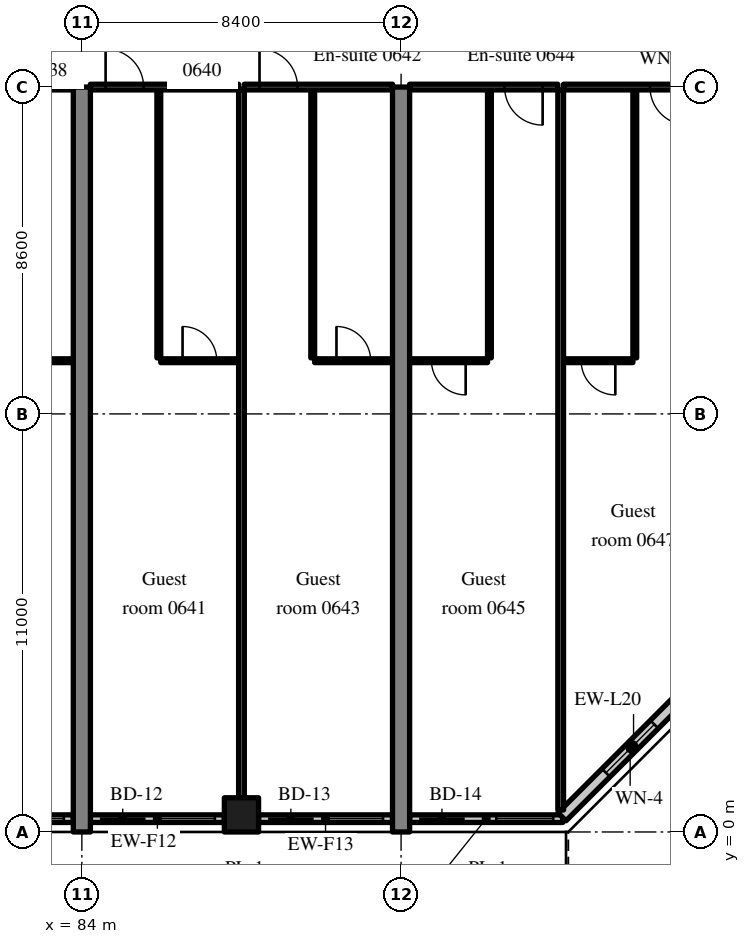
"""IFC4 building model, lengths in metres.
Left out: names, types, materials, properties, quantities, classifications, styles, units other than length and angle.
Written with IfcOpenShell. Run it as: python <this file> out.ifc"""

import sys

from ifc_helpers import new_model, si_unit, direction, frame, frame_2d, origin, origin_2d, place, context, subcontext, project, spatial, rectangle, extrude, source, transform, mapped, element, fill, save


model = new_model("IFC4")
c1 = context("Model", 3, precision=1e-05, world=origin(), true_north=direction((0.0, 1.0)))
c2 = subcontext(c1, "Body", "Model", "MODEL_VIEW")
j1 = project(units=[si_unit("LENGTHUNIT", "METRE"), si_unit("PLANEANGLEUNIT", "RADIAN")], contexts=[c1])
p1 = place(None, origin())
s1 = spatial("IfcSite", under=j1, at=p1, CompositionType="ELEMENT")
p2 = place(p1, origin())
s2 = spatial("IfcBuilding", under=s1, at=p2, CompositionType="ELEMENT")
p3 = place(p2, frame((0.0, 0.0, 31.6)))
s3 = spatial("IfcBuildingStorey", under=s2, at=p3, CompositionType="ELEMENT", Elevation=31.6)
m1 = source(origin(), c2, "Body", "SweptSolid", [
    extrude(rectangle(XDim=19.6, YDim=0.45, at=frame_2d((9.8, 0.0))), origin(), (0.0, 0.0, 1.0), 3.52),
])
for number, where, z_axis, x_axis in (
    (1, (84.0, 0.0, 0.0), (0.0, 0.0, 1.0), (0.0, 1.0, 0.0)),
    (2, (92.4, 0.0, 0.0), (0.0, 0.0, 1.0), (0.0, 1.0, 0.0)),
):
    element("IfcWall", number, at=place(p3, frame(where, z_axis=z_axis, x_axis=x_axis)), inside=s3, PredefinedType="SHEAR", context=c2, shape_type="MappedRepresentation", body=[
        mapped(m1, transform((0.0, 0.0, 0.0), scale=1.0)),
    ])
m2 = source(origin(), c2, "Body", "SweptSolid", [
    extrude(rectangle(XDim=0.9, YDim=0.9, at=origin_2d()), origin(), (0.0, 0.0, 1.0), 3.52),
])
p4 = place(p3, frame((88.2, 0.45, 0.0), z_axis=(0.0, 0.0, 1.0), x_axis=(1.0, 0.0, 0.0)))
e3 = element("IfcColumn", 3, at=p4, inside=s3, PredefinedType="COLUMN", context=c2, shape_type="MappedRepresentation", body=[
    mapped(m2, transform((0.0, 0.0, 0.0), scale=1.0)),
])
m3 = source(origin(), c2, "Body", "SweptSolid", [
    extrude(rectangle(XDim=3.525, YDim=0.2, at=frame_2d((1.762, 0.0))), origin(), (0.0, 0.0, 1.0), 2.77),
])
p5 = place(p3, frame((80.25, 0.35, 0.0), z_axis=(0.0, 0.0, 1.0), x_axis=(1.0, 0.0, 0.0)))
e4 = element("IfcWall", 4, at=p5, inside=s3, PredefinedType="SOLIDWALL", context=c2, shape_type="MappedRepresentation", body=[
    mapped(m3, transform((0.0, 0.0, 0.0), scale=1.0)),
])
m4 = source(origin(), c2, "Body", "SweptSolid", [
    extrude(rectangle(XDim=1.2, YDim=2.4, at=frame_2d((0.6, 1.2))), frame((0.0, 0.11, 0.0), z_axis=(0.0, -1.0, 0.0), x_axis=(1.0, 0.0, 0.0)), (0.0, 0.0, 1.0), 0.22),
])
p6 = place(p5, frame((0.25, 0.0, 0.0)))
e5 = element("IfcOpeningElement", 5, at=p6, cuts=e4, PredefinedType="OPENING", context=c2, shape_type="MappedRepresentation", body=[
    mapped(m4, transform((0.0, 0.0, 0.0), scale=1.0)),
])
m5 = source(origin(), c2, "Body", "SweptSolid", [
    extrude(rectangle(XDim=1.5, YDim=1.5, at=frame_2d((0.75, 0.75))), frame((0.0, 0.11, 0.0), z_axis=(0.0, -1.0, 0.0), x_axis=(1.0, 0.0, 0.0)), (0.0, 0.0, 1.0), 0.22),
])
p7 = place(p5, frame((1.775, 0.0, 0.9)))
e6 = element("IfcOpeningElement", 6, at=p7, cuts=e4, PredefinedType="OPENING", context=c2, shape_type="MappedRepresentation", body=[
    mapped(m5, transform((0.0, 0.0, 0.0), scale=1.0)),
])
p8 = place(p3, frame((84.225, 0.35, 0.0), z_axis=(0.0, 0.0, 1.0), x_axis=(1.0, 0.0, 0.0)))
e7 = element("IfcWall", 7, at=p8, inside=s3, PredefinedType="SOLIDWALL", context=c2, shape_type="MappedRepresentation", body=[
    mapped(m3, transform((0.0, 0.0, 0.0), scale=1.0)),
])
p9 = place(p8, frame((0.25, 0.0, 0.0)))
e8 = element("IfcOpeningElement", 8, at=p9, cuts=e7, PredefinedType="OPENING", context=c2, shape_type="MappedRepresentation", body=[
    mapped(m4, transform((0.0, 0.0, 0.0), scale=1.0)),
])
p10 = place(p8, frame((1.775, 0.0, 0.9)))
e9 = element("IfcOpeningElement", 9, at=p10, cuts=e7, PredefinedType="OPENING", context=c2, shape_type="MappedRepresentation", body=[
    mapped(m5, transform((0.0, 0.0, 0.0), scale=1.0)),
])
m6 = source(origin(), c2, "Body", "SweptSolid", [
    extrude(rectangle(XDim=3.525, YDim=0.2, at=frame_2d((1.763, 0.0))), origin(), (0.0, 0.0, 1.0), 2.77),
])
p11 = place(p3, frame((88.65, 0.35, 0.0), z_axis=(0.0, 0.0, 1.0), x_axis=(1.0, 0.0, 0.0)))
e10 = element("IfcWall", 10, at=p11, inside=s3, PredefinedType="SOLIDWALL", context=c2, shape_type="MappedRepresentation", body=[
    mapped(m6, transform((0.0, 0.0, 0.0), scale=1.0)),
])
p12 = place(p11, frame((0.25, 0.0, 0.0)))
e11 = element("IfcOpeningElement", 11, at=p12, cuts=e10, PredefinedType="OPENING", context=c2, shape_type="MappedRepresentation", body=[
    mapped(m4, transform((0.0, 0.0, 0.0), scale=1.0)),
])
p13 = place(p11, frame((1.775, 0.0, 0.9)))
e12 = element("IfcOpeningElement", 12, at=p13, cuts=e10, PredefinedType="OPENING", context=c2, shape_type="MappedRepresentation", body=[
    mapped(m5, transform((0.0, 0.0, 0.0), scale=1.0)),
])
m7 = source(origin(), c2, "Body", "SweptSolid", [
    extrude(rectangle(XDim=4.03, YDim=0.2, at=frame_2d((2.015, 0.0))), origin(), (0.0, 0.0, 1.0), 2.77),
])
p14 = place(p3, frame((92.625, 0.35, 0.0), z_axis=(0.0, 0.0, 1.0), x_axis=(1.0, 0.0, 0.0)))
e13 = element("IfcWall", 13, at=p14, inside=s3, PredefinedType="SOLIDWALL", context=c2, shape_type="MappedRepresentation", body=[
    mapped(m7, transform((0.0, 0.0, 0.0), scale=1.0)),
])
p15 = place(p14, frame((0.25, 0.0, 0.0)))
e14 = element("IfcOpeningElement", 14, at=p15, cuts=e13, PredefinedType="OPENING", context=c2, shape_type="MappedRepresentation", body=[
    mapped(m4, transform((0.0, 0.0, 0.0), scale=1.0)),
])
p16 = place(p14, frame((2.28, 0.0, 0.9)))
e15 = element("IfcOpeningElement", 15, at=p16, cuts=e13, PredefinedType="OPENING", context=c2, shape_type="MappedRepresentation", body=[
    mapped(m5, transform((0.0, 0.0, 0.0), scale=1.0)),
])
m8 = source(origin(), c2, "Body", "SweptSolid", [
    extrude(rectangle(XDim=5.326, YDim=0.3, at=frame_2d((2.663, 0.0))), origin(), (0.0, 0.0, 1.0), 3.52),
])
p17 = place(p3, frame((96.634, 0.4, 0.0), z_axis=(0.0, 0.0, 1.0), x_axis=(0.707083859269, 0.707129702361, 0.0)))
e16 = element("IfcWall", 16, at=p17, inside=s3, PredefinedType="SOLIDWALL", context=c2, shape_type="MappedRepresentation", body=[
    mapped(m8, transform((0.0, 0.0, 0.0), scale=1.0)),
])
m9 = source(origin(), c2, "Body", "SweptSolid", [
    extrude(rectangle(XDim=1.8, YDim=1.5, at=frame_2d((0.9, 0.75))), frame((0.0, 0.16, 0.0), z_axis=(0.0, -1.0, 0.0), x_axis=(1.0, 0.0, 0.0)), (0.0, 0.0, 1.0), 0.32),
])
p18 = place(p17, frame((1.636, 0.0, 0.9)))
e17 = element("IfcOpeningElement", 17, at=p18, cuts=e16, PredefinedType="OPENING", context=c2, shape_type="MappedRepresentation", body=[
    mapped(m9, transform((0.0, 0.0, 0.0), scale=1.0)),
])
m10 = source(origin(), c2, "Body", "SweptSolid", [
    extrude(rectangle(XDim=2.05, YDim=0.1, at=frame_2d((1.025, 0.0))), origin(), (0.0, 0.0, 1.0), 3.52),
])
p19 = place(p3, frame((81.725, 12.4, 0.0), z_axis=(0.0, 0.0, 1.0), x_axis=(1.0, 0.0, 0.0)))
e18 = element("IfcWall", 18, at=p19, inside=s3, PredefinedType="PARTITIONING", context=c2, shape_type="MappedRepresentation", body=[
    mapped(m10, transform((0.0, 0.0, 0.0), scale=1.0)),
])
m11 = source(origin(), c2, "Body", "SweptSolid", [
    extrude(rectangle(XDim=0.9, YDim=2.1, at=frame_2d((0.45, 1.05))), frame((0.0, 0.06, 0.0), z_axis=(0.0, -1.0, 0.0), x_axis=(1.0, 0.0, 0.0)), (0.0, 0.0, 1.0), 0.12),
])
p20 = place(p19, frame((0.575, 0.0, 0.0)))
e19 = element("IfcOpeningElement", 19, at=p20, cuts=e18, PredefinedType="OPENING", context=c2, shape_type="MappedRepresentation", body=[
    mapped(m11, transform((0.0, 0.0, 0.0), scale=1.0)),
])
m12 = source(origin(), c2, "Body", "SweptSolid", [
    extrude(rectangle(XDim=3.9, YDim=0.15, at=frame_2d((1.95, 0.0))), origin(), (0.0, 0.0, 1.0), 2.82),
])
p21 = place(p3, frame((79.875, 19.6, 0.0), z_axis=(0.0, 0.0, 1.0), x_axis=(1.0, 0.0, 0.0)))
e20 = element("IfcWall", 20, at=p21, inside=s3, PredefinedType="PARTITIONING", context=c2, shape_type="MappedRepresentation", body=[
    mapped(m12, transform((0.0, 0.0, 0.0), scale=1.0)),
])
m13 = source(origin(), c2, "Body", "SweptSolid", [
    extrude(rectangle(XDim=1.0, YDim=2.1, at=frame_2d((0.5, 1.05))), frame((0.0, 0.085, 0.0), z_axis=(0.0, -1.0, 0.0), x_axis=(1.0, 0.0, 0.0)), (0.0, 0.0, 1.0), 0.17),
])
p22 = place(p21, frame((0.4, 0.0, 0.0)))
e21 = element("IfcOpeningElement", 21, at=p22, cuts=e20, PredefinedType="OPENING", context=c2, shape_type="MappedRepresentation", body=[
    mapped(m13, transform((0.0, 0.0, 0.0), scale=1.0)),
])
m14 = source(origin(), c2, "Body", "SweptSolid", [
    extrude(rectangle(XDim=7.05, YDim=0.1, at=frame_2d((3.525, 0.0))), origin(), (0.0, 0.0, 1.0), 3.52),
])
p23 = place(p3, frame((86.025, 12.475, 0.0), z_axis=(0.0, 0.0, 1.0), x_axis=(0.0, 1.0, 0.0)))
e22 = element("IfcWall", 22, at=p23, inside=s3, PredefinedType="PARTITIONING", context=c2, shape_type="MappedRepresentation", body=[
    mapped(m14, transform((0.0, 0.0, 0.0), scale=1.0)),
])
m15 = source(origin(), c2, "Body", "SweptSolid", [
    extrude(rectangle(XDim=2.05, YDim=0.1, at=frame_2d((1.025, 0.0))), origin(), (0.0, 0.0, 1.0), 3.52),
])
p24 = place(p3, frame((86.075, 12.4, 0.0), z_axis=(0.0, 0.0, 1.0), x_axis=(1.0, 0.0, 0.0)))
e23 = element("IfcWall", 23, at=p24, inside=s3, PredefinedType="PARTITIONING", context=c2, shape_type="MappedRepresentation", body=[
    mapped(m15, transform((0.0, 0.0, 0.0), scale=1.0)),
])
p25 = place(p24, frame((0.575, 0.0, 0.0)))
e24 = element("IfcOpeningElement", 24, at=p25, cuts=e23, PredefinedType="OPENING", context=c2, shape_type="MappedRepresentation", body=[
    mapped(m11, transform((0.0, 0.0, 0.0), scale=1.0)),
])
p26 = place(p3, frame((84.225, 19.6, 0.0), z_axis=(0.0, 0.0, 1.0), x_axis=(1.0, 0.0, 0.0)))
e25 = element("IfcWall", 25, at=p26, inside=s3, PredefinedType="PARTITIONING", context=c2, shape_type="MappedRepresentation", body=[
    mapped(m12, transform((0.0, 0.0, 0.0), scale=1.0)),
])
p27 = place(p26, frame((0.4, 0.0, 0.0)))
e26 = element("IfcOpeningElement", 26, at=p27, cuts=e25, PredefinedType="OPENING", context=c2, shape_type="MappedRepresentation", body=[
    mapped(m13, transform((0.0, 0.0, 0.0), scale=1.0)),
])
p28 = place(p3, frame((90.075, 12.475, 0.0), z_axis=(0.0, 0.0, 1.0), x_axis=(0.0, 1.0, 0.0)))
e27 = element("IfcWall", 27, at=p28, inside=s3, PredefinedType="PARTITIONING", context=c2, shape_type="MappedRepresentation", body=[
    mapped(m14, transform((0.0, 0.0, 0.0), scale=1.0)),
])
p29 = place(p3, frame((90.125, 12.4, 0.0), z_axis=(0.0, 0.0, 1.0), x_axis=(1.0, 0.0, 0.0)))
e28 = element("IfcWall", 28, at=p29, inside=s3, PredefinedType="PARTITIONING", context=c2, shape_type="MappedRepresentation", body=[
    mapped(m15, transform((0.0, 0.0, 0.0), scale=1.0)),
])
p30 = place(p29, frame((0.575, 0.0, 0.0)))
e29 = element("IfcOpeningElement", 29, at=p30, cuts=e28, PredefinedType="OPENING", context=c2, shape_type="MappedRepresentation", body=[
    mapped(m11, transform((0.0, 0.0, 0.0), scale=1.0)),
])
m16 = source(origin(), c2, "Body", "SweptSolid", [
    extrude(rectangle(XDim=3.9, YDim=0.15, at=frame_2d((1.95, 0.0))), origin(), (0.0, 0.0, 1.0), 2.82),
])
p31 = place(p3, frame((88.275, 19.6, 0.0), z_axis=(0.0, 0.0, 1.0), x_axis=(1.0, 0.0, 0.0)))
e30 = element("IfcWall", 30, at=p31, inside=s3, PredefinedType="PARTITIONING", context=c2, shape_type="MappedRepresentation", body=[
    mapped(m16, transform((0.0, 0.0, 0.0), scale=1.0)),
])
p32 = place(p31, frame((0.4, 0.0, 0.0)))
e31 = element("IfcOpeningElement", 31, at=p32, cuts=e30, PredefinedType="OPENING", context=c2, shape_type="MappedRepresentation", body=[
    mapped(m13, transform((0.0, 0.0, 0.0), scale=1.0)),
])
m17 = source(origin(), c2, "Body", "SweptSolid", [
    extrude(rectangle(XDim=18.625, YDim=0.15, at=frame_2d((9.312, 0.0))), origin(), (0.0, 0.0, 1.0), 3.52),
])
p33 = place(p3, frame((88.2, 0.9, 0.0), z_axis=(0.0, 0.0, 1.0), x_axis=(0.0, 1.0, 0.0)))
e32 = element("IfcWall", 32, at=p33, inside=s3, PredefinedType="PARTITIONING", context=c2, shape_type="MappedRepresentation", body=[
    mapped(m17, transform((0.0, 0.0, 0.0), scale=1.0)),
])
p34 = place(p3, frame((94.725, 12.475, 0.0), z_axis=(0.0, 0.0, 1.0), x_axis=(0.0, 1.0, 0.0)))
e33 = element("IfcWall", 33, at=p34, inside=s3, PredefinedType="PARTITIONING", context=c2, shape_type="MappedRepresentation", body=[
    mapped(m14, transform((0.0, 0.0, 0.0), scale=1.0)),
])
p35 = place(p3, frame((92.625, 12.4, 0.0), z_axis=(0.0, 0.0, 1.0), x_axis=(1.0, 0.0, 0.0)))
e34 = element("IfcWall", 34, at=p35, inside=s3, PredefinedType="PARTITIONING", context=c2, shape_type="MappedRepresentation", body=[
    mapped(m15, transform((0.0, 0.0, 0.0), scale=1.0)),
])
p36 = place(p35, frame((0.575, 0.0, 0.0)))
e35 = element("IfcOpeningElement", 35, at=p36, cuts=e34, PredefinedType="OPENING", context=c2, shape_type="MappedRepresentation", body=[
    mapped(m11, transform((0.0, 0.0, 0.0), scale=1.0)),
])
p37 = place(p3, frame((92.625, 19.6, 0.0), z_axis=(0.0, 0.0, 1.0), x_axis=(1.0, 0.0, 0.0)))
e36 = element("IfcWall", 36, at=p37, inside=s3, PredefinedType="PARTITIONING", context=c2, shape_type="MappedRepresentation", body=[
    mapped(m12, transform((0.0, 0.0, 0.0), scale=1.0)),
])
p38 = place(p37, frame((2.5, 0.0, 0.0)))
e37 = element("IfcOpeningElement", 37, at=p38, cuts=e36, PredefinedType="OPENING", context=c2, shape_type="MappedRepresentation", body=[
    mapped(m13, transform((0.0, 0.0, 0.0), scale=1.0)),
])
p39 = place(p3, frame((98.55, 12.475, 0.0), z_axis=(0.0, 0.0, 1.0), x_axis=(0.0, 1.0, 0.0)))
e38 = element("IfcWall", 38, at=p39, inside=s3, PredefinedType="PARTITIONING", context=c2, shape_type="MappedRepresentation", body=[
    mapped(m14, transform((0.0, 0.0, 0.0), scale=1.0)),
])
m18 = source(origin(), c2, "Body", "SweptSolid", [
    extrude(rectangle(XDim=1.825, YDim=0.1, at=frame_2d((0.913, 0.0))), origin(), (0.0, 0.0, 1.0), 3.52),
])
p40 = place(p3, frame((96.675, 12.4, 0.0), z_axis=(0.0, 0.0, 1.0), x_axis=(1.0, 0.0, 0.0)))
e39 = element("IfcWall", 39, at=p40, inside=s3, PredefinedType="PARTITIONING", context=c2, shape_type="MappedRepresentation", body=[
    mapped(m18, transform((0.0, 0.0, 0.0), scale=1.0)),
])
p41 = place(p40, frame((0.463, 0.0, 0.0)))
e40 = element("IfcOpeningElement", 40, at=p41, cuts=e39, PredefinedType="OPENING", context=c2, shape_type="MappedRepresentation", body=[
    mapped(m11, transform((0.0, 0.0, 0.0), scale=1.0)),
])
m19 = source(origin(), c2, "Body", "SweptSolid", [
    extrude(rectangle(XDim=3.675, YDim=0.15, at=frame_2d((1.837, 0.0))), origin(), (0.0, 0.0, 1.0), 2.82),
])
p42 = place(p3, frame((96.675, 19.6, 0.0), z_axis=(0.0, 0.0, 1.0), x_axis=(1.0, 0.0, 0.0)))
e41 = element("IfcWall", 41, at=p42, inside=s3, PredefinedType="PARTITIONING", context=c2, shape_type="MappedRepresentation", body=[
    mapped(m19, transform((0.0, 0.0, 0.0), scale=1.0)),
])
p43 = place(p42, frame((2.275, 0.0, 0.0)))
e42 = element("IfcOpeningElement", 42, at=p43, cuts=e41, PredefinedType="OPENING", context=c2, shape_type="MappedRepresentation", body=[
    mapped(m13, transform((0.0, 0.0, 0.0), scale=1.0)),
])
m20 = source(origin(), c2, "Body", "SweptSolid", [
    extrude(rectangle(XDim=18.947, YDim=0.15, at=frame_2d((9.474, 0.0))), origin(), (0.0, 0.0, 1.0), 3.52),
])
p44 = place(p3, frame((96.6, 0.578, 0.0), z_axis=(0.0, 0.0, 1.0), x_axis=(0.0, 1.0, 0.0)))
e43 = element("IfcWall", 43, at=p44, inside=s3, PredefinedType="PARTITIONING", context=c2, shape_type="MappedRepresentation", body=[
    mapped(m20, transform((0.0, 0.0, 0.0), scale=1.0)),
])
m21 = source(origin(), c2, "Body", "SweptSolid", [
    extrude(rectangle(XDim=1.5, YDim=1.5, at=frame_2d((0.75, 0.75))), frame((0.0, 0.03, 0.0), z_axis=(0.0, -1.0, 0.0), x_axis=(1.0, 0.0, 0.0)), (0.0, 0.0, 1.0), 0.06),
])
p45 = place(p7, origin())
e44 = element("IfcWindow", 44, at=p45, inside=s3, PartitioningType="SINGLE_PANEL", PredefinedType="WINDOW", context=c2, shape_type="MappedRepresentation", body=[
    mapped(m21, transform((0.0, 0.0, 0.0), scale=1.0)),
])
fill(e6, e44)
m22 = source(origin(), c2, "Body", "SweptSolid", [
    extrude(rectangle(XDim=1.2, YDim=2.4, at=frame_2d((0.6, 1.2))), frame((0.0, 0.025, 0.0), z_axis=(0.0, -1.0, 0.0), x_axis=(1.0, 0.0, 0.0)), (0.0, 0.0, 1.0), 0.05),
])
p46 = place(p9, origin())
e45 = element("IfcDoor", 45, at=p46, inside=s3, OperationType="SLIDING_TO_RIGHT", PredefinedType="DOOR", context=c2, shape_type="MappedRepresentation", body=[
    mapped(m22, transform((0.0, 0.0, 0.0), scale=1.0)),
])
fill(e8, e45)
p47 = place(p10, origin())
e46 = element("IfcWindow", 46, at=p47, inside=s3, PartitioningType="SINGLE_PANEL", PredefinedType="WINDOW", context=c2, shape_type="MappedRepresentation", body=[
    mapped(m21, transform((0.0, 0.0, 0.0), scale=1.0)),
])
fill(e9, e46)
p48 = place(p12, origin())
e47 = element("IfcDoor", 47, at=p48, inside=s3, OperationType="SLIDING_TO_LEFT", PredefinedType="DOOR", context=c2, shape_type="MappedRepresentation", body=[
    mapped(m22, transform((0.0, 0.0, 0.0), scale=1.0)),
])
fill(e11, e47)
p49 = place(p13, origin())
e48 = element("IfcWindow", 48, at=p49, inside=s3, PartitioningType="SINGLE_PANEL", PredefinedType="WINDOW", context=c2, shape_type="MappedRepresentation", body=[
    mapped(m21, transform((0.0, 0.0, 0.0), scale=1.0)),
])
fill(e12, e48)
p50 = place(p15, origin())
e49 = element("IfcDoor", 49, at=p50, inside=s3, OperationType="SLIDING_TO_RIGHT", PredefinedType="DOOR", context=c2, shape_type="MappedRepresentation", body=[
    mapped(m22, transform((0.0, 0.0, 0.0), scale=1.0)),
])
fill(e14, e49)
p51 = place(p16, origin())
e50 = element("IfcWindow", 50, at=p51, inside=s3, PartitioningType="SINGLE_PANEL", PredefinedType="WINDOW", context=c2, shape_type="MappedRepresentation", body=[
    mapped(m21, transform((0.0, 0.0, 0.0), scale=1.0)),
])
fill(e15, e50)
m23 = source(origin(), c2, "Body", "SweptSolid", [
    extrude(rectangle(XDim=1.8, YDim=1.5, at=frame_2d((0.9, 0.75))), frame((0.0, 0.03, 0.0), z_axis=(0.0, -1.0, 0.0), x_axis=(1.0, 0.0, 0.0)), (0.0, 0.0, 1.0), 0.06),
])
p52 = place(p18, origin())
e51 = element("IfcWindow", 51, at=p52, inside=s3, PartitioningType="SINGLE_PANEL", PredefinedType="WINDOW", context=c2, shape_type="MappedRepresentation", body=[
    mapped(m23, transform((0.0, 0.0, 0.0), scale=1.0)),
])
fill(e17, e51)
m24 = source(origin(), c2, "Body", "SweptSolid", [
    extrude(rectangle(XDim=0.9, YDim=2.1, at=frame_2d((0.45, 1.05))), frame((0.0, 0.025, 0.0), z_axis=(0.0, -1.0, 0.0), x_axis=(1.0, 0.0, 0.0)), (0.0, 0.0, 1.0), 0.05),
])
p53 = place(p25, origin())
e52 = element("IfcDoor", 52, at=p53, inside=s3, OperationType="SINGLE_SWING_LEFT", PredefinedType="DOOR", context=c2, shape_type="MappedRepresentation", body=[
    mapped(m24, transform((0.0, 0.0, 0.0), scale=1.0)),
])
fill(e24, e52)
m25 = source(origin(), c2, "Body", "SweptSolid", [
    extrude(rectangle(XDim=1.0, YDim=2.1, at=frame_2d((0.5, 1.05))), frame((0.0, 0.025, 0.0), z_axis=(0.0, -1.0, 0.0), x_axis=(1.0, 0.0, 0.0)), (0.0, 0.0, 1.0), 0.05),
])
p54 = place(p27, origin())
e53 = element("IfcDoor", 53, at=p54, inside=s3, OperationType="SINGLE_SWING_LEFT", PredefinedType="DOOR", context=c2, shape_type="MappedRepresentation", body=[
    mapped(m25, transform((0.0, 0.0, 0.0), scale=1.0)),
])
fill(e26, e53)
p55 = place(p30, origin())
e54 = element("IfcDoor", 54, at=p55, inside=s3, OperationType="SINGLE_SWING_LEFT", PredefinedType="DOOR", context=c2, shape_type="MappedRepresentation", body=[
    mapped(m24, transform((0.0, 0.0, 0.0), scale=1.0)),
])
fill(e29, e54)
p56 = place(p32, origin())
e55 = element("IfcDoor", 55, at=p56, inside=s3, OperationType="SINGLE_SWING_LEFT", PredefinedType="DOOR", context=c2, shape_type="MappedRepresentation", body=[
    mapped(m25, transform((0.0, 0.0, 0.0), scale=1.0)),
])
fill(e31, e55)
p57 = place(p36, origin())
e56 = element("IfcDoor", 56, at=p57, inside=s3, OperationType="SINGLE_SWING_RIGHT", PredefinedType="DOOR", context=c2, shape_type="MappedRepresentation", body=[
    mapped(m24, transform((0.0, 0.0, 0.0), scale=1.0)),
])
fill(e35, e56)
p58 = place(p38, origin())
e57 = element("IfcDoor", 57, at=p58, inside=s3, OperationType="SINGLE_SWING_RIGHT", PredefinedType="DOOR", context=c2, shape_type="MappedRepresentation", body=[
    mapped(m25, transform((0.0, 0.0, 0.0), scale=1.0)),
])
fill(e37, e57)
p59 = place(p41, origin())
e58 = element("IfcDoor", 58, at=p59, inside=s3, OperationType="SINGLE_SWING_RIGHT", PredefinedType="DOOR", context=c2, shape_type="MappedRepresentation", body=[
    mapped(m24, transform((0.0, 0.0, 0.0), scale=1.0)),
])
fill(e40, e58)
p60 = place(p43, origin())
e59 = element("IfcDoor", 59, at=p60, inside=s3, OperationType="SINGLE_SWING_RIGHT", PredefinedType="DOOR", context=c2, shape_type="MappedRepresentation", body=[
    mapped(m25, transform((0.0, 0.0, 0.0), scale=1.0)),
])
fill(e42, e59)
save(model, sys.argv[1])
